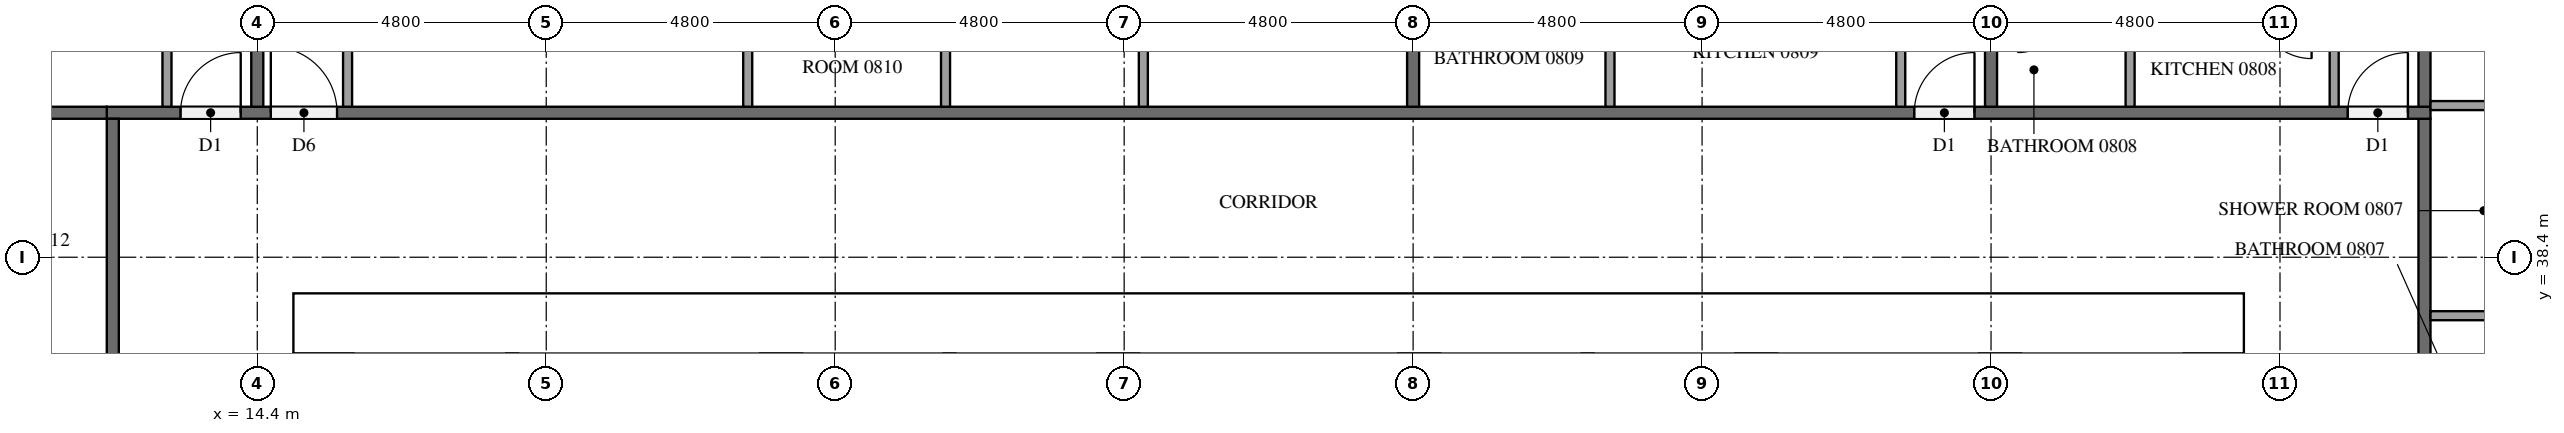
"""IFC4 building model, lengths in metres.
Left out: names, types, materials, properties, quantities, classifications, styles, units other than length and angle.
Written with IfcOpenShell. Run it as: python <this file> out.ifc"""

import sys

from ifc_helpers import new_model, si_unit, direction, frame, frame_2d, origin, place, context, subcontext, project, spatial, rectangle, extrude, element, fill, save


model = new_model("IFC4")
c1 = context("Model", 3, precision=1e-05, world=origin(), true_north=direction((0.0, 1.0)))
c2 = subcontext(c1, "Body", "Model", "MODEL_VIEW")
j1 = project(units=[si_unit("LENGTHUNIT", "METRE"), si_unit("PLANEANGLEUNIT", "RADIAN")], contexts=[c1])
p1 = place(None, origin())
s1 = spatial("IfcSite", under=j1, at=p1, CompositionType="ELEMENT")
p2 = place(p1, origin())
s2 = spatial("IfcBuilding", under=s1, at=p2, CompositionType="ELEMENT")
p3 = place(p2, frame((0.0, 0.0, 36.4)))
s3 = spatial("IfcBuildingStorey", under=s2, at=p3, CompositionType="ELEMENT", Elevation=36.4)
p4 = place(p3, frame((15.0, 37.3, 0.0), z_axis=(0.0, 0.0, 1.0), x_axis=(1.0, 0.0, 0.0)))
e1 = element("IfcWall", 1, at=p4, inside=s3, PredefinedType="SHEAR", context=c2, shape_type="SweptSolid", body=[
    extrude(rectangle(XDim=32.4, YDim=1.0, at=frame_2d((16.2, 0.0))), origin(), (0.0, 0.0, 1.0), 3.2),
])
p5 = place(p4, frame((15.3, 0.0, 0.0)))
e2 = element("IfcOpeningElement", 2, at=p5, cuts=e1, PredefinedType="OPENING", context=c2, shape_type="SweptSolid", body=[
    extrude(rectangle(XDim=1.8, YDim=2.1, at=frame_2d((0.9, 1.05))), frame((0.0, 0.51, 0.0), z_axis=(0.0, -1.0, 0.0), x_axis=(1.0, 0.0, 0.0)), (0.0, 0.0, 1.0), 1.02),
])
p6 = place(p4, frame((1.766, 0.0, 0.0)))
e3 = element("IfcOpeningElement", 3, at=p6, cuts=e1, PredefinedType="OPENING", context=c2, shape_type="SweptSolid", body=[
    extrude(rectangle(XDim=1.0, YDim=2.1, at=frame_2d((0.5, 1.05))), frame((0.0, 0.51, 0.0), z_axis=(0.0, -1.0, 0.0), x_axis=(1.0, 0.0, 0.0)), (0.0, 0.0, 1.0), 1.02),
])
p7 = place(p4, frame((5.241, 0.0, 0.0)))
e4 = element("IfcOpeningElement", 4, at=p7, cuts=e1, PredefinedType="OPENING", context=c2, shape_type="SweptSolid", body=[
    extrude(rectangle(XDim=1.0, YDim=2.1, at=frame_2d((0.5, 1.05))), frame((0.0, 0.51, 0.0), z_axis=(0.0, -1.0, 0.0), x_axis=(1.0, 0.0, 0.0)), (0.0, 0.0, 1.0), 1.02),
])
for number, where, z_axis, x_axis in (
    (5, (28.7, 33.9, 0.0), (0.0, 0.0, 1.0), (0.0, 1.0, 0.0)),
    (6, (33.7, 33.9, 0.0), (0.0, 0.0, 1.0), (0.0, 1.0, 0.0)),
):
    element("IfcWall", number, at=place(p3, frame(where, z_axis=z_axis, x_axis=x_axis)), inside=s3, PredefinedType="SHEAR", context=c2, shape_type="SweptSolid", body=[
        extrude(rectangle(XDim=2.9, YDim=0.7, at=frame_2d((1.45, 0.0))), origin(), (0.0, 0.0, 1.0), 3.2),
    ])
for number, where, z_axis, x_axis in (
    (7, (25.9, 33.9, 0.0), (0.0, 0.0, 1.0), (0.0, 1.0, 0.0)),
    (8, (36.5, 33.9, 0.0), (0.0, 0.0, 1.0), (0.0, 1.0, 0.0)),
):
    element("IfcWall", number, at=place(p3, frame(where, z_axis=z_axis, x_axis=x_axis)), inside=s3, PredefinedType="SOLIDWALL", context=c2, shape_type="SweptSolid", body=[
        extrude(rectangle(XDim=2.9, YDim=0.2, at=frame_2d((1.45, 0.0))), origin(), (0.0, 0.0, 1.0), 3.2),
    ])
p8 = place(p3, frame((18.633, 31.6, 0.0), z_axis=(0.0, 0.0, 1.0), x_axis=(0.0, 1.0, 0.0)))
e9 = element("IfcWall", 9, at=p8, inside=s3, PredefinedType="PARTITIONING", context=c2, shape_type="SweptSolid", body=[
    extrude(rectangle(XDim=5.2, YDim=0.2, at=frame_2d((2.6, 0.0))), origin(), (0.0, 0.0, 1.0), 3.2),
])
p9 = place(p3, frame((50.4, 40.7, 0.0), z_axis=(0.0, 0.0, 1.0), x_axis=(0.0, -1.0, 0.0)))
e10 = element("IfcWall", 10, at=p9, inside=s3, PredefinedType="PARTITIONING", context=c2, shape_type="SweptSolid", body=[
    extrude(rectangle(XDim=28.6, YDim=0.2, at=frame_2d((14.3, 0.0))), origin(), (0.0, 0.0, 1.0), 3.2),
])
p10 = place(p9, frame((27.375, 0.0, 0.0)))
e11 = element("IfcOpeningElement", 11, at=p10, cuts=e10, PredefinedType="OPENING", context=c2, shape_type="SweptSolid", body=[
    extrude(rectangle(XDim=1.1, YDim=2.1, at=frame_2d((0.55, 1.05))), frame((0.0, 0.11, 0.0), z_axis=(0.0, -1.0, 0.0), x_axis=(1.0, 0.0, 0.0)), (0.0, 0.0, 1.0), 0.22),
])
p11 = place(p9, frame((8.225, 0.0, 0.0)))
e12 = element("IfcOpeningElement", 12, at=p11, cuts=e10, PredefinedType="OPENING", context=c2, shape_type="SweptSolid", body=[
    extrude(rectangle(XDim=1.0, YDim=2.1, at=frame_2d((0.5, 1.05))), frame((0.0, 0.11, 0.0), z_axis=(0.0, -1.0, 0.0), x_axis=(1.0, 0.0, 0.0)), (0.0, 0.0, 1.0), 0.22),
])
p12 = place(p3, frame((11.9, 40.8, 0.0), z_axis=(0.0, 0.0, 1.0), x_axis=(1.0, 0.0, 0.0)))
e13 = element("IfcWall", 13, at=p12, inside=s3, PredefinedType="PARTITIONING", context=c2, shape_type="SweptSolid", body=[
    extrude(rectangle(XDim=38.6, YDim=0.2, at=frame_2d((19.3, 0.0))), origin(), (0.0, 0.0, 1.0), 3.2),
])
p13 = place(p12, frame((37.225, 0.0, 0.0)))
e14 = element("IfcOpeningElement", 14, at=p13, cuts=e13, PredefinedType="OPENING", context=c2, shape_type="SweptSolid", body=[
    extrude(rectangle(XDim=1.0, YDim=2.1, at=frame_2d((0.5, 1.05))), frame((0.0, 0.11, 0.0), z_axis=(0.0, -1.0, 0.0), x_axis=(1.0, 0.0, 0.0)), (0.0, 0.0, 1.0), 0.22),
])
p14 = place(p12, frame((30.025, 0.0, 0.0)))
e15 = element("IfcOpeningElement", 15, at=p14, cuts=e13, PredefinedType="OPENING", context=c2, shape_type="SweptSolid", body=[
    extrude(rectangle(XDim=1.0, YDim=2.1, at=frame_2d((0.5, 1.05))), frame((0.0, 0.11, 0.0), z_axis=(0.0, -1.0, 0.0), x_axis=(1.0, 0.0, 0.0)), (0.0, 0.0, 1.0), 0.22),
])
p15 = place(p12, frame((2.725, 0.0, 0.0)))
e16 = element("IfcOpeningElement", 16, at=p15, cuts=e13, PredefinedType="OPENING", context=c2, shape_type="SweptSolid", body=[
    extrude(rectangle(XDim=1.1, YDim=2.1, at=frame_2d((0.55, 1.05))), frame((0.0, 0.11, 0.0), z_axis=(0.0, -1.0, 0.0), x_axis=(1.0, 0.0, 0.0)), (0.0, 0.0, 1.0), 0.22),
])
p16 = place(p12, frame((1.225, 0.0, 0.0)))
e17 = element("IfcOpeningElement", 17, at=p16, cuts=e13, PredefinedType="OPENING", context=c2, shape_type="SweptSolid", body=[
    extrude(rectangle(XDim=1.0, YDim=2.1, at=frame_2d((0.5, 1.05))), frame((0.0, 0.11, 0.0), z_axis=(0.0, -1.0, 0.0), x_axis=(1.0, 0.0, 0.0)), (0.0, 0.0, 1.0), 0.22),
])
p17 = place(p3, frame((12.0, 12.1, 0.0), z_axis=(0.0, 0.0, 1.0), x_axis=(0.0, 1.0, 0.0)))
e18 = element("IfcWall", 18, at=p17, inside=s3, PredefinedType="PARTITIONING", context=c2, shape_type="SweptSolid", body=[
    extrude(rectangle(XDim=28.6, YDim=0.2, at=frame_2d((14.3, 0.0))), origin(), (0.0, 0.0, 1.0), 3.2),
])
p18 = place(p17, frame((16.975, 0.0, 0.0)))
e19 = element("IfcOpeningElement", 19, at=p18, cuts=e18, PredefinedType="OPENING", context=c2, shape_type="SweptSolid", body=[
    extrude(rectangle(XDim=1.0, YDim=2.1, at=frame_2d((0.5, 1.05))), frame((0.0, 0.11, 0.0), z_axis=(0.0, -1.0, 0.0), x_axis=(1.0, 0.0, 0.0)), (0.0, 0.0, 1.0), 0.22),
])
p19 = place(p17, frame((0.175, 0.0, 0.0)))
e20 = element("IfcOpeningElement", 20, at=p19, cuts=e18, PredefinedType="OPENING", context=c2, shape_type="SweptSolid", body=[
    extrude(rectangle(XDim=1.0, YDim=2.1, at=frame_2d((0.5, 1.05))), frame((0.0, 0.11, 0.0), z_axis=(0.0, -1.0, 0.0), x_axis=(1.0, 0.0, 0.0)), (0.0, 0.0, 1.0), 0.22),
])
p20 = place(p3, frame((50.4, 40.9, 0.0), z_axis=(0.0, 0.0, 1.0), x_axis=(0.0, 1.0, 0.0)))
e21 = element("IfcWall", 21, at=p20, inside=s3, PredefinedType="PARTITIONING", context=c2, shape_type="SweptSolid", body=[
    extrude(rectangle(XDim=7.0, YDim=0.2, at=frame_2d((3.5, 0.0))), origin(), (0.0, 0.0, 1.0), 3.2),
])
for number, where, z_axis, x_axis in (
    (22, (43.2, 47.55, 0.0), (0.0, 0.0, 1.0), (0.0, -1.0, 0.0)),
    (23, (33.6, 47.55, 0.0), (0.0, 0.0, 1.0), (0.0, -1.0, 0.0)),
    (24, (14.4, 47.55, 0.0), (0.0, 0.0, 1.0), (0.0, -1.0, 0.0)),
):
    element("IfcWall", number, at=place(p3, frame(where, z_axis=z_axis, x_axis=x_axis)), inside=s3, PredefinedType="PARTITIONING", context=c2, shape_type="SweptSolid", body=[
        extrude(rectangle(XDim=6.65, YDim=0.2, at=frame_2d((3.325, 0.0))), origin(), (0.0, 0.0, 1.0), 3.2),
    ])
p21 = place(p3, frame((0.1, 40.8, 0.0), z_axis=(0.0, 0.0, 1.0), x_axis=(1.0, 0.0, 0.0)))
e25 = element("IfcWall", 25, at=p21, inside=s3, PredefinedType="PARTITIONING", context=c2, shape_type="SweptSolid", body=[
    extrude(rectangle(XDim=11.8, YDim=0.2, at=frame_2d((5.9, 0.0))), origin(), (0.0, 0.0, 1.0), 3.2),
])
for number, where, z_axis, x_axis in (
    (26, (50.5, 37.429, 0.0), (0.0, 0.0, 1.0), (1.0, 0.0, 0.0)),
    (27, (50.5, 40.919, 0.0), (0.0, 0.0, 1.0), (1.0, 0.0, 0.0)),
):
    element("IfcWall", number, at=place(p3, frame(where, z_axis=z_axis, x_axis=x_axis)), inside=s3, PredefinedType="PARTITIONING", context=c2, shape_type="SweptSolid", body=[
        extrude(rectangle(XDim=1.775, YDim=0.15, at=frame_2d((0.887, 0.0))), origin(), (0.0, 0.0, 1.0), 3.2),
    ])
p22 = place(p3, frame((45.51, 40.9, 0.0), z_axis=(0.0, 0.0, 1.0), x_axis=(0.0, 1.0, 0.0)))
e28 = element("IfcWall", 28, at=p22, inside=s3, PredefinedType="PARTITIONING", context=c2, shape_type="SweptSolid", body=[
    extrude(rectangle(XDim=1.625, YDim=0.15, at=frame_2d((0.812, 0.0))), origin(), (0.0, 0.0, 1.0), 3.2),
])
for number, where, z_axis, x_axis in (
    (29, (48.9, 40.9, 0.0), (0.0, 0.0, 1.0), (0.0, 1.0, 0.0)),
    (30, (36.87, 40.9, 0.0), (0.0, 0.0, 1.0), (0.0, 1.0, 0.0)),
):
    element("IfcWall", number, at=place(p3, frame(where, z_axis=z_axis, x_axis=x_axis)), inside=s3, PredefinedType="PARTITIONING", context=c2, shape_type="SweptSolid", body=[
        extrude(rectangle(XDim=1.775, YDim=0.15, at=frame_2d((0.888, 0.0))), origin(), (0.0, 0.0, 1.0), 3.2),
    ])
p23 = place(p3, frame((41.7, 40.9, 0.0), z_axis=(0.0, 0.0, 1.0), x_axis=(0.0, 1.0, 0.0)))
e31 = element("IfcWall", 31, at=p23, inside=s3, PredefinedType="PARTITIONING", context=c2, shape_type="SweptSolid", body=[
    extrude(rectangle(XDim=1.925, YDim=0.15, at=frame_2d((0.962, 0.0))), origin(), (0.0, 0.0, 1.0), 3.2),
])
for number, where, z_axis, x_axis in (
    (32, (22.547, 40.9, 0.0), (0.0, 0.0, 1.0), (0.0, 1.0, 0.0)),
    (33, (25.833, 40.9, 0.0), (0.0, 0.0, 1.0), (0.0, 1.0, 0.0)),
    (34, (29.119, 40.9, 0.0), (0.0, 0.0, 1.0), (0.0, 1.0, 0.0)),
):
    element("IfcWall", number, at=place(p3, frame(where, z_axis=z_axis, x_axis=x_axis)), inside=s3, PredefinedType="PARTITIONING", context=c2, shape_type="SweptSolid", body=[
        extrude(rectangle(XDim=2.075, YDim=0.15, at=frame_2d((1.038, 0.0))), origin(), (0.0, 0.0, 1.0), 3.2),
    ])
p24 = place(p3, frame((15.9, 40.9, 0.0), z_axis=(0.0, 0.0, 1.0), x_axis=(0.0, 1.0, 0.0)))
e35 = element("IfcWall", 35, at=p24, inside=s3, PredefinedType="PARTITIONING", context=c2, shape_type="SweptSolid", body=[
    extrude(rectangle(XDim=2.225, YDim=0.15, at=frame_2d((1.113, 0.0))), origin(), (0.0, 0.0, 1.0), 3.2),
])
p25 = place(p3, frame((12.9, 40.9, 0.0), z_axis=(0.0, 0.0, 1.0), x_axis=(0.0, 1.0, 0.0)))
e36 = element("IfcWall", 36, at=p25, inside=s3, PredefinedType="PARTITIONING", context=c2, shape_type="SweptSolid", body=[
    extrude(rectangle(XDim=2.075, YDim=0.15, at=frame_2d((1.038, 0.0))), origin(), (0.0, 0.0, 1.0), 3.2),
])
p26 = place(p5, origin())
e37 = element("IfcDoor", 37, at=p26, inside=s3, OperationType="DOUBLE_DOOR_SINGLE_SWING", PredefinedType="DOOR", context=c2, shape_type="SweptSolid", body=[
    extrude(rectangle(XDim=1.8, YDim=2.1, at=frame_2d((0.9, 1.05))), frame((0.0, 0.025, 0.0), z_axis=(0.0, -1.0, 0.0), x_axis=(1.0, 0.0, 0.0)), (0.0, 0.0, 1.0), 0.05),
])
fill(e2, e37)
p27 = place(p6, origin())
e38 = element("IfcDoor", 38, at=p27, inside=s3, OperationType="SINGLE_SWING_LEFT", PredefinedType="DOOR", context=c2, shape_type="SweptSolid", body=[
    extrude(rectangle(XDim=1.0, YDim=2.1, at=frame_2d((0.5, 1.05))), frame((0.0, 0.025, 0.0), z_axis=(0.0, -1.0, 0.0), x_axis=(1.0, 0.0, 0.0)), (0.0, 0.0, 1.0), 0.05),
])
fill(e3, e38)
p28 = place(p7, origin())
e39 = element("IfcDoor", 39, at=p28, inside=s3, OperationType="SINGLE_SWING_RIGHT", PredefinedType="DOOR", context=c2, shape_type="SweptSolid", body=[
    extrude(rectangle(XDim=1.0, YDim=2.1, at=frame_2d((0.5, 1.05))), frame((0.0, 0.025, 0.0), z_axis=(0.0, -1.0, 0.0), x_axis=(1.0, 0.0, 0.0)), (0.0, 0.0, 1.0), 0.05),
])
fill(e4, e39)
p29 = place(p13, origin())
e40 = element("IfcDoor", 40, at=p29, inside=s3, OperationType="SINGLE_SWING_RIGHT", PredefinedType="DOOR", context=c2, shape_type="SweptSolid", body=[
    extrude(rectangle(XDim=1.0, YDim=2.1, at=frame_2d((0.5, 1.05))), frame((0.0, 0.025, 0.0), z_axis=(0.0, -1.0, 0.0), x_axis=(1.0, 0.0, 0.0)), (0.0, 0.0, 1.0), 0.05),
])
fill(e14, e40)
p30 = place(p14, origin())
e41 = element("IfcDoor", 41, at=p30, inside=s3, OperationType="SINGLE_SWING_RIGHT", PredefinedType="DOOR", context=c2, shape_type="SweptSolid", body=[
    extrude(rectangle(XDim=1.0, YDim=2.1, at=frame_2d((0.5, 1.05))), frame((0.0, 0.025, 0.0), z_axis=(0.0, -1.0, 0.0), x_axis=(1.0, 0.0, 0.0)), (0.0, 0.0, 1.0), 0.05),
])
fill(e15, e41)
p31 = place(p15, origin())
e42 = element("IfcDoor", 42, at=p31, inside=s3, OperationType="SINGLE_SWING_LEFT", PredefinedType="DOOR", context=c2, shape_type="SweptSolid", body=[
    extrude(rectangle(XDim=1.1, YDim=2.1, at=frame_2d((0.55, 1.05))), frame((0.0, 0.025, 0.0), z_axis=(0.0, -1.0, 0.0), x_axis=(1.0, 0.0, 0.0)), (0.0, 0.0, 1.0), 0.05),
])
fill(e16, e42)
p32 = place(p16, origin())
e43 = element("IfcDoor", 43, at=p32, inside=s3, OperationType="SINGLE_SWING_RIGHT", PredefinedType="DOOR", context=c2, shape_type="SweptSolid", body=[
    extrude(rectangle(XDim=1.0, YDim=2.1, at=frame_2d((0.5, 1.05))), frame((0.0, 0.025, 0.0), z_axis=(0.0, -1.0, 0.0), x_axis=(1.0, 0.0, 0.0)), (0.0, 0.0, 1.0), 0.05),
])
fill(e17, e43)
save(model, sys.argv[1])
